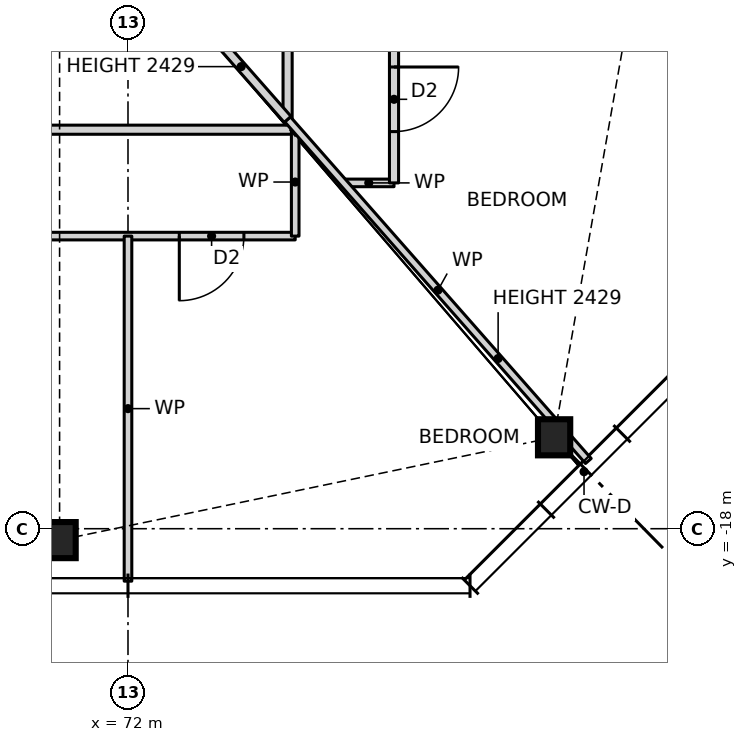
"""IFC4 building model, lengths in metres.
Left out: names, types, materials, properties, quantities, classifications, styles, units other than length and angle.
Written with IfcOpenShell. Run it as: python <this file> out.ifc"""

import sys

from ifc_helpers import new_model, si_unit, direction, frame, frame_2d, origin, origin_2d, place, context, subcontext, project, spatial, rectangle, i_section, extrude, element, fill, save


model = new_model("IFC4")
c1 = context("Model", 3, precision=1e-05, world=origin(), true_north=direction((0.0, 1.0)))
c2 = subcontext(c1, "Body", "Model", "MODEL_VIEW")
j1 = project(units=[si_unit("LENGTHUNIT", "METRE"), si_unit("PLANEANGLEUNIT", "RADIAN")], contexts=[c1])
p1 = place(None, origin())
s1 = spatial("IfcSite", under=j1, at=p1, CompositionType="ELEMENT")
p2 = place(p1, origin())
s2 = spatial("IfcBuilding", under=s1, at=p2, CompositionType="ELEMENT")
p3 = place(p2, frame((0.0, 0.0, 36.0)))
s3 = spatial("IfcBuildingStorey", under=s2, at=p3, CompositionType="ELEMENT", Elevation=36.0)
for number, where, z_axis, x_axis in (
    (1, (71.1, -18.15, 0.0), (0.0, 0.0, 1.0), (1.0, 0.0, 0.0)),
    (2, (77.606, -16.797, 0.0), (0.0, 0.0, 1.0), (1.0, 0.0, 0.0)),
):
    element("IfcColumn", number, at=place(p3, frame(where, z_axis=z_axis, x_axis=x_axis)), inside=s3, PredefinedType="COLUMN", context=c2, shape_type="SweptSolid", body=[
        extrude(i_section(OverallWidth=0.424, OverallDepth=0.475, WebThickness=0.048, FlangeThickness=0.077, at=origin_2d()), origin(), (0.0, 0.0, 1.0), 3.5),
    ])
p4 = place(p3, frame((63.0, -14.15, 0.0), z_axis=(0.0, 0.0, 1.0), x_axis=(1.0, 0.0, 0.0)))
e3 = element("IfcWall", 3, at=p4, inside=s3, PredefinedType="PARTITIONING", context=c2, shape_type="SweptSolid", body=[
    extrude(rectangle(XDim=11.2, YDim=0.1, at=frame_2d((5.6, 0.0))), origin(), (0.0, 0.0, 1.0), 3.27),
])
p5 = place(p4, frame((1.825, 0.0, 0.0)))
e4 = element("IfcOpeningElement", 4, at=p5, cuts=e3, PredefinedType="OPENING", context=c2, shape_type="SweptSolid", body=[
    extrude(rectangle(XDim=0.85, YDim=2.1, at=frame_2d((0.425, 1.05))), frame((0.0, 0.06, 0.0), z_axis=(0.0, -1.0, 0.0), x_axis=(1.0, 0.0, 0.0)), (0.0, 0.0, 1.0), 0.12),
])
p6 = place(p4, frame((6.325, 0.0, 0.0)))
e5 = element("IfcOpeningElement", 5, at=p6, cuts=e3, PredefinedType="OPENING", context=c2, shape_type="SweptSolid", body=[
    extrude(rectangle(XDim=0.85, YDim=2.1, at=frame_2d((0.425, 1.05))), frame((0.0, 0.06, 0.0), z_axis=(0.0, -1.0, 0.0), x_axis=(1.0, 0.0, 0.0)), (0.0, 0.0, 1.0), 0.12),
])
p7 = place(p4, frame((9.675, 0.0, 0.0)))
e6 = element("IfcOpeningElement", 6, at=p7, cuts=e3, PredefinedType="OPENING", context=c2, shape_type="SweptSolid", body=[
    extrude(rectangle(XDim=0.85, YDim=2.1, at=frame_2d((0.425, 1.05))), frame((0.0, 0.06, 0.0), z_axis=(0.0, -1.0, 0.0), x_axis=(1.0, 0.0, 0.0)), (0.0, 0.0, 1.0), 0.12),
])
p8 = place(p3, frame((74.836, -13.45, 0.0), z_axis=(0.0, 0.0, 1.0), x_axis=(1.0, 0.0, 0.0)))
e7 = element("IfcWall", 7, at=p8, inside=s3, PredefinedType="PARTITIONING", context=c2, shape_type="SweptSolid", body=[
    extrude(rectangle(XDim=0.664, YDim=0.1, at=frame_2d((0.332, 0.0))), origin(), (0.0, 0.0, 1.0), 3.27),
])
p9 = place(p3, frame((54.0, -12.75, 0.0), z_axis=(0.0, 0.0, 1.0), x_axis=(1.0, 0.0, 0.0)))
e8 = element("IfcWall", 8, at=p9, inside=s3, PredefinedType="PARTITIONING", context=c2, shape_type="SweptSolid", body=[
    extrude(rectangle(XDim=20.2, YDim=0.12, at=frame_2d((10.1, 0.0))), origin(), (0.0, 0.0, 1.0), 3.27),
])
p10 = place(p9, frame((1.375, 0.0, 0.0)))
e9 = element("IfcOpeningElement", 9, at=p10, cuts=e8, PredefinedType="OPENING", context=c2, shape_type="SweptSolid", body=[
    extrude(rectangle(XDim=0.85, YDim=2.1, at=frame_2d((0.425, 1.05))), frame((0.0, 0.07, 0.0), z_axis=(0.0, -1.0, 0.0), x_axis=(1.0, 0.0, 0.0)), (0.0, 0.0, 1.0), 0.14),
])
p11 = place(p9, frame((4.575, 0.0, 0.0)))
e10 = element("IfcOpeningElement", 10, at=p11, cuts=e8, PredefinedType="OPENING", context=c2, shape_type="SweptSolid", body=[
    extrude(rectangle(XDim=0.85, YDim=2.1, at=frame_2d((0.425, 1.05))), frame((0.0, 0.07, 0.0), z_axis=(0.0, -1.0, 0.0), x_axis=(1.0, 0.0, 0.0)), (0.0, 0.0, 1.0), 0.14),
])
p12 = place(p9, frame((10.225, 0.0, 0.0)))
e11 = element("IfcOpeningElement", 11, at=p12, cuts=e8, PredefinedType="OPENING", context=c2, shape_type="SweptSolid", body=[
    extrude(rectangle(XDim=0.85, YDim=2.1, at=frame_2d((0.425, 1.05))), frame((0.0, 0.07, 0.0), z_axis=(0.0, -1.0, 0.0), x_axis=(1.0, 0.0, 0.0)), (0.0, 0.0, 1.0), 0.14),
])
p13 = place(p9, frame((15.825, 0.0, 0.0)))
e12 = element("IfcOpeningElement", 12, at=p13, cuts=e8, PredefinedType="OPENING", context=c2, shape_type="SweptSolid", body=[
    extrude(rectangle(XDim=0.85, YDim=2.1, at=frame_2d((0.425, 1.05))), frame((0.0, 0.07, 0.0), z_axis=(0.0, -1.0, 0.0), x_axis=(1.0, 0.0, 0.0)), (0.0, 0.0, 1.0), 0.14),
])
p14 = place(p3, frame((75.5, -13.45, 0.0), z_axis=(0.0, 0.0, 1.0), x_axis=(0.0, 1.0, 0.0)))
e13 = element("IfcWall", 13, at=p14, inside=s3, PredefinedType="PARTITIONING", context=c2, shape_type="SweptSolid", body=[
    extrude(rectangle(XDim=6.7, YDim=0.12, at=frame_2d((3.35, 0.0))), origin(), (0.0, 0.0, 1.0), 3.27),
])
p15 = place(p14, frame((5.225, 0.0, 0.0)))
e14 = element("IfcOpeningElement", 14, at=p15, cuts=e13, PredefinedType="OPENING", context=c2, shape_type="SweptSolid", body=[
    extrude(rectangle(XDim=0.85, YDim=2.1, at=frame_2d((0.425, 1.05))), frame((0.0, 0.07, 0.0), z_axis=(0.0, -1.0, 0.0), x_axis=(1.0, 0.0, 0.0)), (0.0, 0.0, 1.0), 0.14),
])
p16 = place(p14, frame((0.675, 0.0, 0.0)))
e15 = element("IfcOpeningElement", 15, at=p16, cuts=e13, PredefinedType="OPENING", context=c2, shape_type="SweptSolid", body=[
    extrude(rectangle(XDim=0.85, YDim=2.1, at=frame_2d((0.425, 1.05))), frame((0.0, 0.07, 0.0), z_axis=(0.0, -1.0, 0.0), x_axis=(1.0, 0.0, 0.0)), (0.0, 0.0, 1.0), 0.14),
])
p17 = place(p3, frame((74.2, -14.15, 0.0), z_axis=(0.0, 0.0, 1.0), x_axis=(0.0, 1.0, 0.0)))
e16 = element("IfcWall", 16, at=p17, inside=s3, PredefinedType="PARTITIONING", context=c2, shape_type="SweptSolid", body=[
    extrude(rectangle(XDim=1.423, YDim=0.1, at=frame_2d((0.711, 0.0))), origin(), (0.0, 0.0, 1.0), 3.27),
])
p18 = place(p3, frame((74.1, -12.614, 0.0), z_axis=(0.0, 0.0, 1.0), x_axis=(0.0, 1.0, 0.0)))
e17 = element("IfcWall", 17, at=p18, inside=s3, PredefinedType="PARTITIONING", context=c2, shape_type="SweptSolid", body=[
    extrude(rectangle(XDim=25.228, YDim=0.12, at=frame_2d((12.614, 0.0))), origin(), (0.0, 0.0, 1.0), 3.27),
])
p19 = place(p18, frame((7.239, 0.0, 0.0)))
e18 = element("IfcOpeningElement", 18, at=p19, cuts=e17, PredefinedType="OPENING", context=c2, shape_type="SweptSolid", body=[
    extrude(rectangle(XDim=0.85, YDim=2.1, at=frame_2d((0.425, 1.05))), frame((0.0, 0.07, 0.0), z_axis=(0.0, -1.0, 0.0), x_axis=(1.0, 0.0, 0.0)), (0.0, 0.0, 1.0), 0.14),
])
p20 = place(p18, frame((10.439, 0.0, 0.0)))
e19 = element("IfcOpeningElement", 19, at=p20, cuts=e17, PredefinedType="OPENING", context=c2, shape_type="SweptSolid", body=[
    extrude(rectangle(XDim=0.85, YDim=2.1, at=frame_2d((0.425, 1.05))), frame((0.0, 0.07, 0.0), z_axis=(0.0, -1.0, 0.0), x_axis=(1.0, 0.0, 0.0)), (0.0, 0.0, 1.0), 0.14),
])
p21 = place(p18, frame((2.507, 0.0, 0.0)))
e20 = element("IfcOpeningElement", 20, at=p21, cuts=e17, PredefinedType="OPENING", context=c2, shape_type="SweptSolid", body=[
    extrude(rectangle(XDim=0.85, YDim=2.1, at=frame_2d((0.425, 1.05))), frame((0.0, 0.07, 0.0), z_axis=(0.0, -1.0, 0.0), x_axis=(1.0, 0.0, 0.0)), (0.0, 0.0, 1.0), 0.14),
])
p22 = place(p18, frame((16.639, 0.0, 0.0)))
e21 = element("IfcOpeningElement", 21, at=p22, cuts=e17, PredefinedType="OPENING", context=c2, shape_type="SweptSolid", body=[
    extrude(rectangle(XDim=0.85, YDim=2.1, at=frame_2d((0.425, 1.05))), frame((0.0, 0.07, 0.0), z_axis=(0.0, -1.0, 0.0), x_axis=(1.0, 0.0, 0.0)), (0.0, 0.0, 1.0), 0.14),
])
p23 = place(p18, frame((21.821, 0.0, 0.0)))
e22 = element("IfcOpeningElement", 22, at=p23, cuts=e17, PredefinedType="OPENING", context=c2, shape_type="SweptSolid", body=[
    extrude(rectangle(XDim=0.85, YDim=2.1, at=frame_2d((0.425, 1.05))), frame((0.0, 0.07, 0.0), z_axis=(0.0, -1.0, 0.0), x_axis=(1.0, 0.0, 0.0)), (0.0, 0.0, 1.0), 0.14),
])
p24 = place(p3, frame((72.0, -18.69, 0.0), z_axis=(0.0, 0.0, 1.0), x_axis=(0.0, 1.0, 0.0)))
e23 = element("IfcWall", 23, at=p24, inside=s3, PredefinedType="PARTITIONING", context=c2, shape_type="SweptSolid", body=[
    extrude(rectangle(XDim=4.54, YDim=0.1, at=frame_2d((2.27, 0.0))), origin(), (0.0, 0.0, 1.0), 3.27),
])
p25 = place(p3, frame((78.057, -17.109, 0.0), z_axis=(0.0, 0.0, 1.0), x_axis=(-0.660775837956, 0.750583301156, 0.0)))
e24 = element("IfcWall", 24, at=p25, inside=s3, PredefinedType="PARTITIONING", context=c2, shape_type="SweptSolid", body=[
    extrude(rectangle(XDim=5.989, YDim=0.1, at=frame_2d((2.994, 0.0))), origin(), (0.0, 0.0, 1.0), 2.429),
])
p26 = place(p3, frame((74.1, -12.614, 0.0), z_axis=(0.0, 0.0, 1.0), x_axis=(-0.660767161141, 0.750590939699, 0.0)))
e25 = element("IfcWall", 25, at=p26, inside=s3, PredefinedType="PARTITIONING", context=c2, shape_type="SweptSolid", body=[
    extrude(rectangle(XDim=3.082, YDim=0.12, at=frame_2d((1.541, 0.0))), origin(), (0.0, 0.0, 1.0), 2.429),
])
p27 = place(p7, frame((0.85, 0.0, 0.0), z_axis=(0.0, 0.0, 1.0), x_axis=(-1.0, 0.0, 0.0)))
e26 = element("IfcDoor", 26, at=p27, inside=s3, OperationType="SINGLE_SWING_RIGHT", PredefinedType="DOOR", context=c2, shape_type="SweptSolid", body=[
    extrude(rectangle(XDim=0.85, YDim=2.1, at=frame_2d((0.425, 1.05))), frame((0.0, 0.025, 0.0), z_axis=(0.0, -1.0, 0.0), x_axis=(1.0, 0.0, 0.0)), (0.0, 0.0, 1.0), 0.05),
])
fill(e6, e26)
p28 = place(p16, frame((0.85, 0.0, 0.0), z_axis=(0.0, 0.0, 1.0), x_axis=(-1.0, 0.0, 0.0)))
e27 = element("IfcDoor", 27, at=p28, inside=s3, OperationType="SINGLE_SWING_LEFT", PredefinedType="DOOR", context=c2, shape_type="SweptSolid", body=[
    extrude(rectangle(XDim=0.85, YDim=2.1, at=frame_2d((0.425, 1.05))), frame((0.0, 0.025, 0.0), z_axis=(0.0, -1.0, 0.0), x_axis=(1.0, 0.0, 0.0)), (0.0, 0.0, 1.0), 0.05),
])
fill(e15, e27)
save(model, sys.argv[1])
